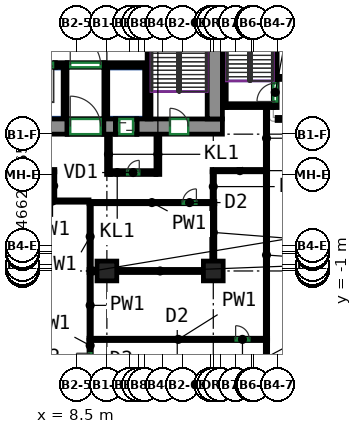
"""IFC4 building model, lengths in metres.
Left out: names, types, materials, properties, quantities, classifications, styles, units other than length and angle.
Written with IfcOpenShell. Run it as: python <this file> out.ifc"""

import sys

from ifc_helpers import new_model, si_unit, direction, frame, frame_2d, origin, origin_2d, place, context, subcontext, project, spatial, rectangle, extrude, source, transform, mapped, element, fill, save


model = new_model("IFC4")
c1 = context("Model", 3, precision=1e-05, world=origin(), true_north=direction((0.0, 1.0)))
c2 = subcontext(c1, "Body", "Model", "MODEL_VIEW")
j1 = project(units=[si_unit("LENGTHUNIT", "METRE"), si_unit("PLANEANGLEUNIT", "RADIAN")], contexts=[c1])
p1 = place(None, origin())
s1 = spatial("IfcSite", under=j1, at=p1, CompositionType="ELEMENT")
p2 = place(p1, origin())
s2 = spatial("IfcBuilding", under=s1, at=p2, CompositionType="ELEMENT")
p3 = place(p2, origin())
s3 = spatial("IfcBuildingStorey", under=s2, at=p3, CompositionType="ELEMENT", Elevation=0.0)
m1 = source(origin(), c2, "Body", "SweptSolid", [
    extrude(rectangle(XDim=1.3, YDim=1.3, at=origin_2d()), origin(), (0.0, 0.0, 1.0), 8.6),
])
for number, where, z_axis, x_axis in (
    (1, (10.5, -1.0, 0.0), (0.0, 0.0, 1.0), (1.0, 0.0, 0.0)),
    (2, (17.5, -1.0, 0.0), (0.0, 0.0, 1.0), (1.0, 0.0, 0.0)),
):
    element("IfcColumn", number, at=place(p3, frame(where, z_axis=z_axis, x_axis=x_axis)), inside=s3, PredefinedType="COLUMN", context=c2, shape_type="MappedRepresentation", body=[
        mapped(m1, transform((0.0, 0.0, 0.0))),
    ])
m2 = source(origin(), c2, "Body", "SweptSolid", [
    extrude(rectangle(XDim=14.18, YDim=1.0, at=frame_2d((7.09, 0.0))), origin(), (0.0, 0.0, 1.0), 8.6),
])
p4 = place(p3, frame((-6.29, 8.5, 0.0), z_axis=(0.0, 0.0, 1.0), x_axis=(1.0, 0.0, 0.0)))
e3 = element("IfcWall", 3, at=p4, inside=s3, PredefinedType="SHEAR", context=c2, shape_type="MappedRepresentation", body=[
    mapped(m2, transform((0.0, 0.0, 0.0))),
])
m3 = source(origin(), c2, "Body", "SweptSolid", [
    extrude(rectangle(XDim=0.78, YDim=1.0, at=frame_2d((0.39, 0.0))), origin(), (0.0, 0.0, 1.0), 8.6),
])
p5 = place(p3, frame((10.29, 8.5, 0.0), z_axis=(0.0, 0.0, 1.0), x_axis=(1.0, 0.0, 0.0)))
e4 = element("IfcWall", 4, at=p5, inside=s3, PredefinedType="SHEAR", context=c2, shape_type="MappedRepresentation", body=[
    mapped(m3, transform((0.0, 0.0, 0.0))),
])
m4 = source(origin(), c2, "Body", "SweptSolid", [
    extrude(rectangle(XDim=5.63, YDim=1.0, at=frame_2d((2.815, 0.0))), origin(), (0.0, 0.0, 1.0), 8.6),
])
p6 = place(p3, frame((12.47, 8.5, 0.0), z_axis=(0.0, 0.0, 1.0), x_axis=(1.0, 0.0, 0.0)))
e5 = element("IfcWall", 5, at=p6, inside=s3, PredefinedType="SHEAR", context=c2, shape_type="MappedRepresentation", body=[
    mapped(m4, transform((0.0, 0.0, 0.0))),
])
p7 = place(p6, frame((2.18, 0.0, 0.0)))
e6 = element("IfcOpeningElement", 6, at=p7, cuts=e5, PredefinedType="OPENING", context=c2, shape_type="SweptSolid", body=[
    extrude(rectangle(XDim=1.2, YDim=2.1, at=frame_2d((0.6, 1.05))), frame((0.0, 0.51, 0.0), z_axis=(0.0, -1.0, 0.0), x_axis=(1.0, 0.0, 0.0)), (0.0, 0.0, 1.0), 1.02),
])
m5 = source(origin(), c2, "Body", "SweptSolid", [
    extrude(rectangle(XDim=12.0, YDim=1.0, at=frame_2d((6.0, 0.0))), origin(), (0.0, 0.0, 1.0), 8.6),
])
p8 = place(p3, frame((17.6, 9.0, 0.0), z_axis=(0.0, 0.0, 1.0), x_axis=(0.0, 1.0, 0.0)))
e7 = element("IfcWall", 7, at=p8, inside=s3, PredefinedType="SHEAR", context=c2, shape_type="MappedRepresentation", body=[
    mapped(m5, transform((0.0, 0.0, 0.0))),
])
m6 = source(origin(), c2, "Body", "SweptSolid", [
    extrude(rectangle(XDim=7.75, YDim=0.25, at=frame_2d((3.875, 0.0))), origin(), (0.0, 0.0, 1.0), 8.6),
])
p9 = place(p3, frame((13.275, 9.0, 0.0), z_axis=(0.0, 0.0, 1.0), x_axis=(0.0, 1.0, 0.0)))
e8 = element("IfcWall", 8, at=p9, inside=s3, PredefinedType="SHEAR", context=c2, shape_type="MappedRepresentation", body=[
    mapped(m6, transform((0.0, 0.0, 0.0))),
])
m7 = source(origin(), c2, "Body", "SweptSolid", [
    extrude(rectangle(XDim=8.0, YDim=0.25, at=frame_2d((4.0, 0.0))), origin(), (0.0, 0.0, 1.0), 8.6),
])
p10 = place(p3, frame((18.225, 9.75, 0.0), z_axis=(0.0, 0.0, 1.0), x_axis=(0.0, 1.0, 0.0)))
e9 = element("IfcWall", 9, at=p10, inside=s3, PredefinedType="SHEAR", context=c2, shape_type="MappedRepresentation", body=[
    mapped(m7, transform((0.0, 0.0, 0.0))),
])
p11 = place(p3, frame((21.575, 9.75, 0.0), z_axis=(0.0, 0.0, 1.0), x_axis=(0.0, 1.0, 0.0)))
e10 = element("IfcWall", 10, at=p11, inside=s3, PredefinedType="SHEAR", context=c2, shape_type="MappedRepresentation", body=[
    mapped(m7, transform((0.0, 0.0, 0.0))),
])
p12 = place(p11, frame((0.4, 0.0, 0.0)))
e11 = element("IfcOpeningElement", 11, at=p12, cuts=e10, PredefinedType="OPENING", context=c2, shape_type="SweptSolid", body=[
    extrude(rectangle(XDim=1.2, YDim=2.1, at=frame_2d((0.6, 1.05))), frame((0.0, 0.135, 0.0), z_axis=(0.0, -1.0, 0.0), x_axis=(1.0, 0.0, 0.0)), (0.0, 0.0, 1.0), 0.27),
])
m8 = source(origin(), c2, "Body", "SweptSolid", [
    extrude(rectangle(XDim=3.1, YDim=0.25, at=frame_2d((1.55, 0.0))), origin(), (0.0, 0.0, 1.0), 8.6),
])
p13 = place(p3, frame((18.35, 9.875, 0.0), z_axis=(0.0, 0.0, 1.0), x_axis=(1.0, 0.0, 0.0)))
e12 = element("IfcWall", 12, at=p13, inside=s3, PredefinedType="SHEAR", context=c2, shape_type="MappedRepresentation", body=[
    mapped(m8, transform((0.0, 0.0, 0.0))),
])
m9 = source(origin(), c2, "Body", "SweptSolid", [
    extrude(rectangle(XDim=6.0, YDim=0.2, at=frame_2d((3.0, 0.0))), origin(), (0.0, 0.0, 1.0), 8.6),
])
p14 = place(p3, frame((21.7, 9.0, 0.0), z_axis=(0.0, 0.0, 1.0), x_axis=(1.0, 0.0, 0.0)))
e13 = element("IfcWall", 13, at=p14, inside=s3, PredefinedType="SHEAR", context=c2, shape_type="MappedRepresentation", body=[
    mapped(m9, transform((0.0, 0.0, 0.0))),
])
p15 = place(p3, frame((21.7, 11.7, 0.0), z_axis=(0.0, 0.0, 1.0), x_axis=(1.0, 0.0, 0.0)))
e14 = element("IfcWall", 14, at=p15, inside=s3, PredefinedType="SHEAR", context=c2, shape_type="MappedRepresentation", body=[
    mapped(m9, transform((0.0, 0.0, 0.0))),
])
p16 = place(p15, frame((2.3, 0.0, 0.0)))
e15 = element("IfcOpeningElement", 15, at=p16, cuts=e14, PredefinedType="OPENING", context=c2, shape_type="SweptSolid", body=[
    extrude(rectangle(XDim=1.0, YDim=2.1, at=frame_2d((0.5, 1.05))), frame((0.0, 0.11, 0.0), z_axis=(0.0, -1.0, 0.0), x_axis=(1.0, 0.0, 0.0)), (0.0, 0.0, 1.0), 0.22),
])
m10 = source(origin(), c2, "Body", "SweptSolid", [
    extrude(rectangle(XDim=0.78, YDim=0.3, at=frame_2d((0.39, 0.0))), origin(), (0.0, 0.0, 1.0), 8.6),
])
p17 = place(p3, frame((7.11, 12.55, 0.0), z_axis=(0.0, 0.0, 1.0), x_axis=(1.0, 0.0, 0.0)))
e16 = element("IfcWall", 16, at=p17, inside=s3, PredefinedType="SHEAR", context=c2, shape_type="MappedRepresentation", body=[
    mapped(m10, transform((0.0, 0.0, 0.0))),
])
m11 = source(origin(), c2, "Body", "SweptSolid", [
    extrude(rectangle(XDim=2.82, YDim=0.3, at=frame_2d((1.41, 0.0))), origin(), (0.0, 0.0, 1.0), 8.6),
])
p18 = place(p3, frame((10.29, 12.55, 0.0), z_axis=(0.0, 0.0, 1.0), x_axis=(1.0, 0.0, 0.0)))
e17 = element("IfcWall", 17, at=p18, inside=s3, PredefinedType="SHEAR", context=c2, shape_type="MappedRepresentation", body=[
    mapped(m11, transform((0.0, 0.0, 0.0))),
])
m12 = source(origin(), c2, "Body", "SweptSolid", [
    extrude(rectangle(XDim=2.4, YDim=1.0, at=frame_2d((1.2, 0.0))), origin(), (0.0, 0.0, 1.0), 4.4),
])
p19 = place(p3, frame((7.89, 8.5, 4.2), z_axis=(0.0, 0.0, 1.0), x_axis=(1.0, 0.0, 0.0)))
e18 = element("IfcWall", 18, at=p19, inside=s3, PredefinedType="SHEAR", context=c2, shape_type="MappedRepresentation", body=[
    mapped(m12, transform((0.0, 0.0, 0.0))),
])
m13 = source(origin(), c2, "Body", "SweptSolid", [
    extrude(rectangle(XDim=1.4, YDim=1.0, at=frame_2d((0.7, 0.0))), origin(), (0.0, 0.0, 1.0), 4.65),
])
p20 = place(p3, frame((11.07, 8.5, 3.95), z_axis=(0.0, 0.0, 1.0), x_axis=(1.0, 0.0, 0.0)))
e19 = element("IfcWall", 19, at=p20, inside=s3, PredefinedType="SHEAR", context=c2, shape_type="MappedRepresentation", body=[
    mapped(m13, transform((0.0, 0.0, 0.0))),
])
m14 = source(origin(), c2, "Body", "SweptSolid", [
    extrude(rectangle(XDim=1.4, YDim=0.3, at=frame_2d((0.7, 0.0))), origin(), (0.0, 0.0, 1.0), 8.6),
])
p21 = place(p3, frame((5.71, 12.55, 0.0), z_axis=(0.0, 0.0, 1.0), x_axis=(1.0, 0.0, 0.0)))
e20 = element("IfcWall", 20, at=p21, inside=s3, PredefinedType="PARTITIONING", context=c2, shape_type="MappedRepresentation", body=[
    mapped(m14, transform((0.0, 0.0, 0.0))),
])
p22 = place(p21, frame((0.15, 0.0, 0.0)))
e21 = element("IfcOpeningElement", 21, at=p22, cuts=e20, PredefinedType="OPENING", context=c2, shape_type="SweptSolid", body=[
    extrude(rectangle(XDim=1.1, YDim=2.1, at=frame_2d((0.55, 1.05))), frame((0.0, 0.16, 0.0), z_axis=(0.0, -1.0, 0.0), x_axis=(1.0, 0.0, 0.0)), (0.0, 0.0, 1.0), 0.32),
])
m15 = source(origin(), c2, "Body", "SweptSolid", [
    extrude(rectangle(XDim=2.4, YDim=0.3, at=frame_2d((1.2, 0.0))), origin(), (0.0, 0.0, 1.0), 8.6),
])
p23 = place(p3, frame((7.89, 12.55, 0.0), z_axis=(0.0, 0.0, 1.0), x_axis=(1.0, 0.0, 0.0)))
e22 = element("IfcWall", 22, at=p23, inside=s3, PredefinedType="PARTITIONING", context=c2, shape_type="MappedRepresentation", body=[
    mapped(m15, transform((0.0, 0.0, 0.0))),
])
p24 = place(p23, frame((0.2, 0.0, 0.0)))
e23 = element("IfcOpeningElement", 23, at=p24, cuts=e22, PredefinedType="OPENING", context=c2, shape_type="SweptSolid", body=[
    extrude(rectangle(XDim=2.0, YDim=2.1, at=frame_2d((1.0, 1.05))), frame((0.0, 0.16, 0.0), z_axis=(0.0, -1.0, 0.0), x_axis=(1.0, 0.0, 0.0)), (0.0, 0.0, 1.0), 0.32),
])
m16 = source(origin(), c2, "Body", "SweptSolid", [
    extrude(rectangle(XDim=2.65, YDim=0.25, at=frame_2d((1.325, 0.0))), origin(), (0.0, 0.0, 1.0), 8.6),
])
for number, where, z_axis, x_axis in (
    (24, (10.605, 5.35, 0.0), (0.0, 0.0, 1.0), (0.0, 1.0, 0.0)),
    (25, (13.855, 5.35, 0.0), (0.0, 0.0, 1.0), (0.0, 1.0, 0.0)),
):
    element("IfcWall", number, at=place(p3, frame(where, z_axis=z_axis, x_axis=x_axis)), inside=s3, PredefinedType="PARTITIONING", context=c2, shape_type="MappedRepresentation", body=[
        mapped(m16, transform((0.0, 0.0, 0.0))),
    ])
m17 = source(origin(), c2, "Body", "SweptSolid", [
    extrude(rectangle(XDim=3.0, YDim=0.25, at=frame_2d((1.5, 0.0))), origin(), (0.0, 0.0, 1.0), 8.6),
])
p25 = place(p3, frame((10.73, 5.475, 0.0), z_axis=(0.0, 0.0, 1.0), x_axis=(1.0, 0.0, 0.0)))
e26 = element("IfcWall", 26, at=p25, inside=s3, PredefinedType="PARTITIONING", context=c2, shape_type="MappedRepresentation", body=[
    mapped(m17, transform((0.0, 0.0, 0.0))),
])
p26 = place(p25, frame((1.1, 0.0, 0.0)))
e27 = element("IfcOpeningElement", 27, at=p26, cuts=e26, PredefinedType="OPENING", context=c2, shape_type="SweptSolid", body=[
    extrude(rectangle(XDim=0.8, YDim=2.0, at=frame_2d((0.4, 1.0))), frame((0.0, 0.135, 0.0), z_axis=(0.0, -1.0, 0.0), x_axis=(1.0, 0.0, 0.0)), (0.0, 0.0, 1.0), 0.27),
])
m18 = source(origin(), c2, "Body", "SweptSolid", [
    extrude(rectangle(XDim=3.4, YDim=0.25, at=frame_2d((1.7, 0.0))), origin(), (0.0, 0.0, 1.0), 8.6),
])
p27 = place(p3, frame((10.43, 9.0, 0.0), z_axis=(0.0, 0.0, 1.0), x_axis=(0.0, 1.0, 0.0)))
e28 = element("IfcWall", 28, at=p27, inside=s3, PredefinedType="PARTITIONING", context=c2, shape_type="MappedRepresentation", body=[
    mapped(m18, transform((0.0, 0.0, 0.0))),
])
m19 = source(origin(), c2, "Body", "SweptSolid", [
    extrude(rectangle(XDim=3.4, YDim=0.165, at=frame_2d((1.7, 0.0))), origin(), (0.0, 0.0, 1.0), 8.6),
])
p28 = place(p3, frame((13.067, 9.0, 0.0), z_axis=(0.0, 0.0, 1.0), x_axis=(0.0, 1.0, 0.0)))
e29 = element("IfcWall", 29, at=p28, inside=s3, PredefinedType="PARTITIONING", context=c2, shape_type="MappedRepresentation", body=[
    mapped(m19, transform((0.0, 0.0, 0.0))),
])
p29 = place(p3, frame((7.75, 9.0, 0.0), z_axis=(0.0, 0.0, 1.0), x_axis=(0.0, 1.0, 0.0)))
e30 = element("IfcWall", 30, at=p29, inside=s3, PredefinedType="PARTITIONING", context=c2, shape_type="MappedRepresentation", body=[
    mapped(m18, transform((0.0, 0.0, 0.0))),
])
m20 = source(origin(), c2, "Body", "SweptSolid", [
    extrude(rectangle(XDim=2.4, YDim=1.0, at=frame_2d((1.2, 0.0))), origin(), (0.0, 0.0, 1.0), 2.7),
])
p30 = place(p3, frame((7.89, 8.5, 0.0), z_axis=(0.0, 0.0, 1.0), x_axis=(1.0, 0.0, 0.0)))
e31 = element("IfcWall", 31, at=p30, inside=s3, PredefinedType="PARTITIONING", context=c2, shape_type="MappedRepresentation", body=[
    mapped(m20, transform((0.0, 0.0, 0.0))),
])
p31 = place(p30, frame((0.2, 0.0, 0.0)))
e32 = element("IfcOpeningElement", 32, at=p31, cuts=e31, PredefinedType="OPENING", context=c2, shape_type="SweptSolid", body=[
    extrude(rectangle(XDim=2.0, YDim=2.1, at=frame_2d((1.0, 1.05))), frame((0.0, 0.51, 0.0), z_axis=(0.0, -1.0, 0.0), x_axis=(1.0, 0.0, 0.0)), (0.0, 0.0, 1.0), 1.02),
])
m21 = source(origin(), c2, "Body", "SweptSolid", [
    extrude(rectangle(XDim=1.4, YDim=1.0, at=frame_2d((0.7, 0.0))), origin(), (0.0, 0.0, 1.0), 2.7),
])
p32 = place(p3, frame((11.07, 8.5, 0.0), z_axis=(0.0, 0.0, 1.0), x_axis=(1.0, 0.0, 0.0)))
e33 = element("IfcWall", 33, at=p32, inside=s3, PredefinedType="PARTITIONING", context=c2, shape_type="MappedRepresentation", body=[
    mapped(m21, transform((0.0, 0.0, 0.0))),
])
p33 = place(p32, frame((0.25, 0.0, 0.0)))
e34 = element("IfcOpeningElement", 34, at=p33, cuts=e33, PredefinedType="OPENING", context=c2, shape_type="SweptSolid", body=[
    extrude(rectangle(XDim=0.9, YDim=2.1, at=frame_2d((0.45, 1.05))), frame((0.0, 0.51, 0.0), z_axis=(0.0, -1.0, 0.0), x_axis=(1.0, 0.0, 0.0)), (0.0, 0.0, 1.0), 1.02),
])
p34 = place(p3, frame((21.0, -7.8, 0.0), z_axis=(0.0, 0.0, 1.0), x_axis=(0.0, 1.0, 0.0)))
e35 = element("IfcWall", 35, at=p34, inside=s3, PredefinedType="PARTITIONING", context=c2, shape_type="SweptSolid", body=[
    extrude(rectangle(XDim=2.235, YDim=0.15, at=frame_2d((1.118, 0.0))), origin(), (0.0, 0.0, 1.0), 8.6),
])
p35 = place(p3, frame((21.0, 5.665, 0.0), z_axis=(0.0, 0.0, 1.0), x_axis=(0.0, 1.0, 0.0)))
e36 = element("IfcWall", 36, at=p35, inside=s3, PredefinedType="PARTITIONING", context=c2, shape_type="SweptSolid", body=[
    extrude(rectangle(XDim=4.135, YDim=0.15, at=frame_2d((2.067, 0.0))), origin(), (0.0, 0.0, 1.0), 8.6),
])
p36 = place(p3, frame((21.0, -5.434, 0.0), z_axis=(0.0, 0.0, 1.0), x_axis=(0.0, 1.0, 0.0)))
e37 = element("IfcWall", 37, at=p36, inside=s3, PredefinedType="PARTITIONING", context=c2, shape_type="SweptSolid", body=[
    extrude(rectangle(XDim=10.968, YDim=0.15, at=frame_2d((5.484, 0.0))), origin(), (0.0, 0.0, 1.0), 8.6),
])
p37 = place(p3, frame((9.4, -7.835, 0.0), z_axis=(0.0, 0.0, 1.0), x_axis=(0.0, 1.0, 0.0)))
e38 = element("IfcWall", 38, at=p37, inside=s3, PredefinedType="PARTITIONING", context=c2, shape_type="SweptSolid", body=[
    extrude(rectangle(XDim=2.27, YDim=0.15, at=frame_2d((1.135, 0.0))), origin(), (0.0, 0.0, 1.0), 8.6),
])
p38 = place(p37, frame((0.523, 0.0, 0.0)))
e39 = element("IfcOpeningElement", 39, at=p38, cuts=e38, PredefinedType="OPENING", context=c2, shape_type="SweptSolid", body=[
    extrude(rectangle(XDim=0.9, YDim=2.1, at=frame_2d((0.45, 1.05))), frame((0.0, 0.085, 0.0), z_axis=(0.0, -1.0, 0.0), x_axis=(1.0, 0.0, 0.0)), (0.0, 0.0, 1.0), 0.17),
])
p39 = place(p3, frame((4.525, 3.6, 0.0), z_axis=(0.0, 0.0, 1.0), x_axis=(1.0, 0.0, 0.0)))
e40 = element("IfcWall", 40, at=p39, inside=s3, PredefinedType="PARTITIONING", context=c2, shape_type="SweptSolid", body=[
    extrude(rectangle(XDim=4.8, YDim=0.15, at=frame_2d((2.4, 0.0))), origin(), (0.0, 0.0, 1.0), 8.6),
])
for number, where, z_axis, x_axis in (
    (41, (9.4, -0.91, 0.0), (0.0, 0.0, 1.0), (0.0, 1.0, 0.0)),
    (42, (9.4, -5.434, 0.0), (0.0, 0.0, 1.0), (0.0, 1.0, 0.0)),
):
    element("IfcWall", number, at=place(p3, frame(where, z_axis=z_axis, x_axis=x_axis)), inside=s3, PredefinedType="PARTITIONING", context=c2, shape_type="SweptSolid", body=[
        extrude(rectangle(XDim=4.344, YDim=0.15, at=frame_2d((2.172, 0.0))), origin(), (0.0, 0.0, 1.0), 8.6),
    ])
p40 = place(p3, frame((9.325, -5.5, 0.0), z_axis=(0.0, 0.0, 1.0), x_axis=(1.0, 0.0, 0.0)))
e43 = element("IfcWall", 43, at=p40, inside=s3, PredefinedType="PARTITIONING", context=c2, shape_type="SweptSolid", body=[
    extrude(rectangle(XDim=11.75, YDim=0.15, at=frame_2d((5.875, 0.0))), origin(), (0.0, 0.0, 1.0), 8.6),
])
p41 = place(p40, frame((9.645, 0.0, 0.0)))
e44 = element("IfcOpeningElement", 44, at=p41, cuts=e43, PredefinedType="OPENING", context=c2, shape_type="SweptSolid", body=[
    extrude(rectangle(XDim=0.9, YDim=2.1, at=frame_2d((0.45, 1.05))), frame((0.0, 0.085, 0.0), z_axis=(0.0, -1.0, 0.0), x_axis=(1.0, 0.0, 0.0)), (0.0, 0.0, 1.0), 0.17),
])
p42 = place(p3, frame((7.0, 5.525, 0.0), z_axis=(0.0, 0.0, 1.0), x_axis=(0.0, -1.0, 0.0)))
e45 = element("IfcWall", 45, at=p42, inside=s3, PredefinedType="PARTITIONING", context=c2, shape_type="SweptSolid", body=[
    extrude(rectangle(XDim=1.85, YDim=0.15, at=frame_2d((0.925, 0.0))), origin(), (0.0, 0.0, 1.0), 8.6),
])
p43 = place(p3, frame((-3.575, 5.6, 0.0), z_axis=(0.0, 0.0, 1.0), x_axis=(1.0, 0.0, 0.0)))
e46 = element("IfcWall", 46, at=p43, inside=s3, PredefinedType="PARTITIONING", context=c2, shape_type="SweptSolid", body=[
    extrude(rectangle(XDim=10.65, YDim=0.15, at=frame_2d((5.325, 0.0))), origin(), (0.0, 0.0, 1.0), 8.6),
])
p44 = place(p43, frame((8.746, 0.0, 0.0)))
e47 = element("IfcOpeningElement", 47, at=p44, cuts=e46, PredefinedType="OPENING", context=c2, shape_type="SweptSolid", body=[
    extrude(rectangle(XDim=0.9, YDim=2.1, at=frame_2d((0.45, 1.05))), frame((0.0, 0.085, 0.0), z_axis=(0.0, -1.0, 0.0), x_axis=(1.0, 0.0, 0.0)), (0.0, 0.0, 1.0), 0.17),
])
p45 = place(p3, frame((9.325, 3.5, 0.0), z_axis=(0.0, 0.0, 1.0), x_axis=(1.0, 0.0, 0.0)))
e48 = element("IfcWall", 48, at=p45, inside=s3, PredefinedType="PARTITIONING", context=c2, shape_type="SweptSolid", body=[
    extrude(rectangle(XDim=8.275, YDim=0.15, at=frame_2d((4.138, 0.0))), origin(), (0.0, 0.0, 1.0), 8.6),
])
p46 = place(p45, frame((6.164, 0.0, 0.0)))
e49 = element("IfcOpeningElement", 49, at=p46, cuts=e48, PredefinedType="OPENING", context=c2, shape_type="SweptSolid", body=[
    extrude(rectangle(XDim=0.9, YDim=2.1, at=frame_2d((0.45, 1.05))), frame((0.0, 0.085, 0.0), z_axis=(0.0, -1.0, 0.0), x_axis=(1.0, 0.0, 0.0)), (0.0, 0.0, 1.0), 0.17),
])
p47 = place(p3, frame((17.425, 5.6, 0.0), z_axis=(0.0, 0.0, 1.0), x_axis=(1.0, 0.0, 0.0)))
e50 = element("IfcWall", 50, at=p47, inside=s3, PredefinedType="PARTITIONING", context=c2, shape_type="SweptSolid", body=[
    extrude(rectangle(XDim=3.65, YDim=0.15, at=frame_2d((1.825, 0.0))), origin(), (0.0, 0.0, 1.0), 8.6),
])
p48 = place(p3, frame((17.5, 3.575, 0.0), z_axis=(0.0, 0.0, 1.0), x_axis=(0.0, 1.0, 0.0)))
e51 = element("IfcWall", 51, at=p48, inside=s3, PredefinedType="PARTITIONING", context=c2, shape_type="SweptSolid", body=[
    extrude(rectangle(XDim=1.95, YDim=0.15, at=frame_2d((0.975, 0.0))), origin(), (0.0, 0.0, 1.0), 8.6),
])
p49 = place(p3, frame((11.15, -1.0, 0.0), z_axis=(0.0, 0.0, 1.0), x_axis=(1.0, 0.0, 0.0)))
e52 = element("IfcWall", 52, at=p49, inside=s3, PredefinedType="PARTITIONING", context=c2, shape_type="SweptSolid", body=[
    extrude(rectangle(XDim=5.7, YDim=0.2, at=frame_2d((2.85, 0.0))), origin(), (0.0, 0.0, 1.0), 7.95),
])
p50 = place(p3, frame((9.326, -1.0, 0.0), z_axis=(0.0, 0.0, 1.0), x_axis=(1.0, 0.0, 0.0)))
e53 = element("IfcWall", 53, at=p50, inside=s3, PredefinedType="PARTITIONING", context=c2, shape_type="SweptSolid", body=[
    extrude(rectangle(XDim=0.524, YDim=0.2, at=frame_2d((0.262, 0.0))), origin(), (0.0, 0.0, 1.0), 7.95),
])
p51 = place(p3, frame((17.5, -0.35, 0.0), z_axis=(0.0, 0.0, 1.0), x_axis=(0.0, 1.0, 0.0)))
e54 = element("IfcWall", 54, at=p51, inside=s3, PredefinedType="PARTITIONING", context=c2, shape_type="SweptSolid", body=[
    extrude(rectangle(XDim=3.774, YDim=0.2, at=frame_2d((1.887, 0.0))), origin(), (0.0, 0.0, 1.0), 8.6),
])
p52 = place(p24, origin())
e55 = element("IfcDoor", 55, at=p52, inside=s3, OperationType="DOUBLE_DOOR_SINGLE_SWING", PredefinedType="DOOR", context=c2, shape_type="SweptSolid", body=[
    extrude(rectangle(XDim=2.0, YDim=2.1, at=frame_2d((1.0, 1.05))), frame((0.0, 0.025, 0.0), z_axis=(0.0, -1.0, 0.0), x_axis=(1.0, 0.0, 0.0)), (0.0, 0.0, 1.0), 0.05),
])
fill(e23, e55)
p53 = place(p31, origin())
e56 = element("IfcDoor", 56, at=p53, inside=s3, OperationType="DOUBLE_DOOR_SINGLE_SWING", PredefinedType="DOOR", context=c2, shape_type="SweptSolid", body=[
    extrude(rectangle(XDim=2.0, YDim=2.1, at=frame_2d((1.0, 1.05))), frame((0.0, 0.405, 0.0), z_axis=(0.0, -1.0, 0.0), x_axis=(1.0, 0.0, 0.0)), (0.0, 0.0, 1.0), 0.05),
])
fill(e32, e56)
p54 = place(p26, origin())
e57 = element("IfcDoor", 57, at=p54, inside=s3, OperationType="SINGLE_SWING_RIGHT", PredefinedType="DOOR", context=c2, shape_type="SweptSolid", body=[
    extrude(rectangle(XDim=0.8, YDim=2.0, at=frame_2d((0.4, 1.0))), frame((0.0, 0.025, 0.0), z_axis=(0.0, -1.0, 0.0), x_axis=(1.0, 0.0, 0.0)), (0.0, 0.0, 1.0), 0.05),
])
fill(e27, e57)
p55 = place(p33, origin())
e58 = element("IfcDoor", 58, at=p55, inside=s3, OperationType="SLIDING_TO_LEFT", PredefinedType="DOOR", context=c2, shape_type="SweptSolid", body=[
    extrude(rectangle(XDim=0.9, YDim=2.1, at=frame_2d((0.45, 1.05))), frame((0.0, 0.405, 0.0), z_axis=(0.0, -1.0, 0.0), x_axis=(1.0, 0.0, 0.0)), (0.0, 0.0, 1.0), 0.05),
])
fill(e34, e58)
p56 = place(p22, origin())
e59 = element("IfcDoor", 59, at=p56, inside=s3, OperationType="DOUBLE_DOOR_SLIDING", PredefinedType="DOOR", context=c2, shape_type="SweptSolid", body=[
    extrude(rectangle(XDim=1.1, YDim=2.1, at=frame_2d((0.55, 1.05))), frame((0.0, 0.025, 0.0), z_axis=(0.0, -1.0, 0.0), x_axis=(1.0, 0.0, 0.0)), (0.0, 0.0, 1.0), 0.05),
])
fill(e21, e59)
p57 = place(p7, origin())
e60 = element("IfcDoor", 60, at=p57, inside=s3, OperationType="DOUBLE_DOOR_SINGLE_SWING", PredefinedType="DOOR", context=c2, shape_type="SweptSolid", body=[
    extrude(rectangle(XDim=1.2, YDim=2.1, at=frame_2d((0.6, 1.05))), frame((0.0, 0.405, 0.0), z_axis=(0.0, -1.0, 0.0), x_axis=(1.0, 0.0, 0.0)), (0.0, 0.0, 1.0), 0.05),
])
fill(e6, e60)
p58 = place(p12, origin())
e61 = element("IfcDoor", 61, at=p58, inside=s3, OperationType="DOUBLE_DOOR_SINGLE_SWING", PredefinedType="DOOR", context=c2, shape_type="SweptSolid", body=[
    extrude(rectangle(XDim=1.2, YDim=2.1, at=frame_2d((0.6, 1.05))), frame((0.0, 0.025, 0.0), z_axis=(0.0, -1.0, 0.0), x_axis=(1.0, 0.0, 0.0)), (0.0, 0.0, 1.0), 0.05),
])
fill(e11, e61)
p59 = place(p38, origin())
e62 = element("IfcDoor", 62, at=p59, inside=s3, OperationType="SINGLE_SWING_RIGHT", PredefinedType="DOOR", context=c2, shape_type="SweptSolid", body=[
    extrude(rectangle(XDim=0.9, YDim=2.1, at=frame_2d((0.45, 1.05))), frame((0.0, 0.025, 0.0), z_axis=(0.0, -1.0, 0.0), x_axis=(1.0, 0.0, 0.0)), (0.0, 0.0, 1.0), 0.05),
])
fill(e39, e62)
p60 = place(p41, origin())
e63 = element("IfcDoor", 63, at=p60, inside=s3, OperationType="SINGLE_SWING_LEFT", PredefinedType="DOOR", context=c2, shape_type="SweptSolid", body=[
    extrude(rectangle(XDim=0.9, YDim=2.1, at=frame_2d((0.45, 1.05))), frame((0.0, 0.025, 0.0), z_axis=(0.0, -1.0, 0.0), x_axis=(1.0, 0.0, 0.0)), (0.0, 0.0, 1.0), 0.05),
])
fill(e44, e63)
p61 = place(p46, origin())
e64 = element("IfcDoor", 64, at=p61, inside=s3, OperationType="SINGLE_SWING_RIGHT", PredefinedType="DOOR", context=c2, shape_type="SweptSolid", body=[
    extrude(rectangle(XDim=0.9, YDim=2.1, at=frame_2d((0.45, 1.05))), frame((0.0, 0.025, 0.0), z_axis=(0.0, -1.0, 0.0), x_axis=(1.0, 0.0, 0.0)), (0.0, 0.0, 1.0), 0.05),
])
fill(e49, e64)
save(model, sys.argv[1])
